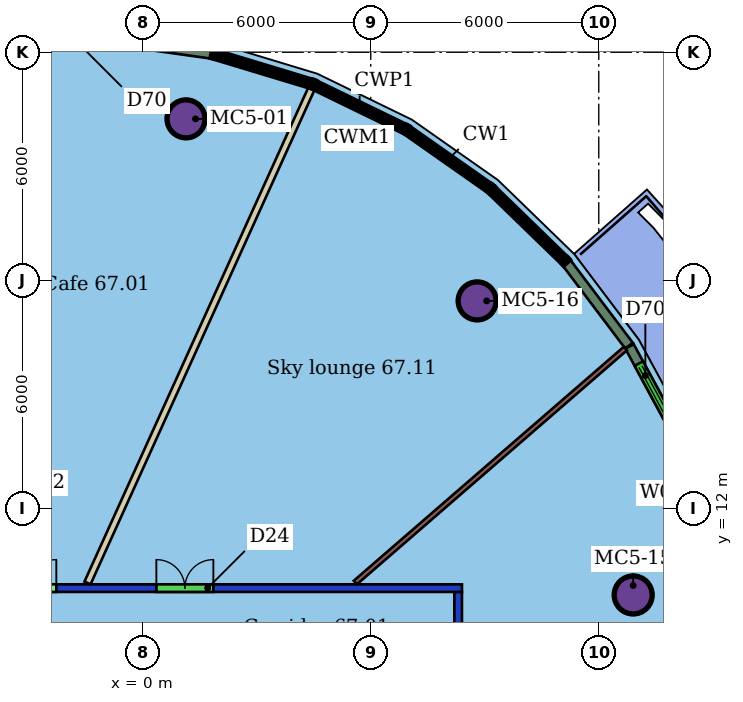
"""IFC4 building model, lengths in metres.
Left out: names, types, materials, properties, quantities, classifications, styles, units other than length and angle.
Written with IfcOpenShell. Run it as: python <this file> out.ifc"""

import sys

from ifc_helpers import new_model, si_unit, direction, frame, frame_2d, origin, origin_2d, place, context, subcontext, project, spatial, rectangle, hollow_circle, extrude, element, fill, save


model = new_model("IFC4")
c1 = context("Model", 3, precision=1e-05, world=origin(), true_north=direction((0.0, 1.0)))
c2 = subcontext(c1, "Body", "Model", "MODEL_VIEW")
j1 = project(units=[si_unit("LENGTHUNIT", "METRE"), si_unit("PLANEANGLEUNIT", "RADIAN")], contexts=[c1])
p1 = place(None, origin())
s1 = spatial("IfcSite", under=j1, at=p1, CompositionType="ELEMENT")
p2 = place(p1, origin())
s2 = spatial("IfcBuilding", under=s1, at=p2, CompositionType="ELEMENT")
p3 = place(p2, frame((0.0, 0.0, 272.1)))
s3 = spatial("IfcBuildingStorey", under=s2, at=p3, CompositionType="ELEMENT", Elevation=272.1)
for number, where, z_axis, x_axis in (
    (1, (1.138, 22.247, 0.0), (0.0, 0.0, 1.0), (1.0, 0.0, 0.0)),
    (2, (12.906, 9.72, 0.0), (0.0, 0.0, 1.0), (1.0, 0.0, 0.0)),
    (3, (8.8, 17.457, 0.0), (0.0, 0.0, 1.0), (1.0, 0.0, 0.0)),
):
    element("IfcColumn", number, at=place(p3, frame(where, z_axis=z_axis, x_axis=x_axis)), inside=s3, PredefinedType="COLUMN", context=c2, shape_type="SweptSolid", body=[
        extrude(hollow_circle(Radius=0.5, WallThickness=0.04, at=origin_2d()), origin(), (0.0, 0.0, 1.0), 3.45),
    ])
p4 = place(p3, frame((-20.4, 9.9, 0.0), z_axis=(0.0, 0.0, 1.0), x_axis=(1.0, 0.0, 0.0)))
e4 = element("IfcWall", 4, at=p4, inside=s3, PredefinedType="PARTITIONING", context=c2, shape_type="SweptSolid", body=[
    extrude(rectangle(XDim=28.8, YDim=0.2, at=frame_2d((14.4, 0.0))), origin(), (0.0, 0.0, 1.0), 3.1),
])
p5 = place(p4, frame((16.626, 0.0, 0.0)))
e5 = element("IfcOpeningElement", 5, at=p5, cuts=e4, PredefinedType="OPENING", context=c2, shape_type="SweptSolid", body=[
    extrude(rectangle(XDim=1.5, YDim=2.4, at=frame_2d((0.75, 1.2))), frame((0.0, 0.11, 0.0), z_axis=(0.0, -1.0, 0.0), x_axis=(1.0, 0.0, 0.0)), (0.0, 0.0, 1.0), 0.22),
])
p6 = place(p4, frame((9.938, 0.0, 0.0)))
e6 = element("IfcOpeningElement", 6, at=p6, cuts=e4, PredefinedType="OPENING", context=c2, shape_type="SweptSolid", body=[
    extrude(rectangle(XDim=1.5, YDim=2.1, at=frame_2d((0.75, 1.05))), frame((0.0, 0.11, 0.0), z_axis=(0.0, -1.0, 0.0), x_axis=(1.0, 0.0, 0.0)), (0.0, 0.0, 1.0), 0.22),
])
p7 = place(p4, frame((20.758, 0.0, 0.0)))
e7 = element("IfcOpeningElement", 7, at=p7, cuts=e4, PredefinedType="OPENING", context=c2, shape_type="SweptSolid", body=[
    extrude(rectangle(XDim=1.5, YDim=2.1, at=frame_2d((0.75, 1.05))), frame((0.0, 0.11, 0.0), z_axis=(0.0, -1.0, 0.0), x_axis=(1.0, 0.0, 0.0)), (0.0, 0.0, 1.0), 0.22),
])
p8 = place(p3, frame((8.3, 9.8, 0.0), z_axis=(0.0, 0.0, 1.0), x_axis=(0.0, -1.0, 0.0)))
e8 = element("IfcWall", 8, at=p8, inside=s3, PredefinedType="PARTITIONING", context=c2, shape_type="SweptSolid", body=[
    extrude(rectangle(XDim=19.6, YDim=0.2, at=frame_2d((9.8, 0.0))), origin(), (0.0, 0.0, 1.0), 3.1),
])
p9 = place(p8, frame((7.396, 0.0, 0.0)))
e9 = element("IfcOpeningElement", 9, at=p9, cuts=e8, PredefinedType="OPENING", context=c2, shape_type="SweptSolid", body=[
    extrude(rectangle(XDim=1.8, YDim=2.4, at=frame_2d((0.9, 1.2))), frame((0.0, 0.11, 0.0), z_axis=(0.0, -1.0, 0.0), x_axis=(1.0, 0.0, 0.0)), (0.0, 0.0, 1.0), 0.22),
])
p10 = place(p8, frame((2.153, 0.0, 0.0)))
e10 = element("IfcOpeningElement", 10, at=p10, cuts=e8, PredefinedType="OPENING", context=c2, shape_type="SweptSolid", body=[
    extrude(rectangle(XDim=1.0, YDim=2.4, at=frame_2d((0.5, 1.2))), frame((0.0, 0.11, 0.0), z_axis=(0.0, -1.0, 0.0), x_axis=(1.0, 0.0, 0.0)), (0.0, 0.0, 1.0), 0.22),
])
p11 = place(p3, frame((4.438, 23.04, 0.0), z_axis=(0.0, 0.0, 1.0), x_axis=(-0.412668744216, -0.910881170926, 0.0)))
e11 = element("IfcWall", 11, at=p11, inside=s3, PredefinedType="PARTITIONING", context=c2, shape_type="SweptSolid", body=[
    extrude(rectangle(XDim=14.276, YDim=0.175, at=frame_2d((7.138, 0.0))), origin(), (0.0, 0.0, 1.0), 3.45),
])
p12 = place(p3, frame((12.698, 16.203, 0.0), z_axis=(0.0, 0.0, 1.0), x_axis=(-0.75573450221, -0.654878127723, 0.0)))
e12 = element("IfcWall", 12, at=p12, inside=s3, PredefinedType="PARTITIONING", context=c2, shape_type="SweptSolid", body=[
    extrude(rectangle(XDim=9.399, YDim=0.125, at=frame_2d((4.7, 0.0))), origin(), (0.0, 0.0, 1.0), 3.45),
])
p13 = place(p3, frame((1.803, 23.958, 0.0), z_axis=(0.0, 0.0, 1.0), x_axis=(-0.99032300217, 0.138781667998, 0.0)))
e13 = element("IfcWall", 13, at=p13, inside=s3, PredefinedType="SOLIDWALL", context=c2, shape_type="SweptSolid", body=[
    extrude(rectangle(XDim=2.72, YDim=0.25, at=frame_2d((1.36, 0.0))), origin(), (0.0, 0.0, 1.0), 3.15),
])
p14 = place(p3, frame((14.156, 13.776, 0.0), z_axis=(0.0, 0.0, 1.0), x_axis=(-0.476845701511, 0.878987017509, 0.0)))
e14 = element("IfcWall", 14, at=p14, inside=s3, PredefinedType="SOLIDWALL", context=c2, shape_type="SweptSolid", body=[
    extrude(rectangle(XDim=2.824, YDim=0.25, at=frame_2d((1.412, 0.0))), origin(), (0.0, 0.0, 1.0), 3.15),
])
p15 = place(p14, frame((0.512, 0.0, 0.0)))
e15 = element("IfcOpeningElement", 15, at=p15, cuts=e14, PredefinedType="OPENING", context=c2, shape_type="SweptSolid", body=[
    extrude(rectangle(XDim=1.8, YDim=2.4, at=frame_2d((0.9, 1.2))), frame((0.0, 0.135, 0.0), z_axis=(0.0, -1.0, 0.0), x_axis=(1.0, 0.0, 0.0)), (0.0, 0.0, 1.0), 0.27),
])
p16 = place(p3, frame((12.796, 16.281, 0.0), z_axis=(0.0, 0.0, 1.0), x_axis=(-0.602094992284, 0.798424461215, 0.0)))
e16 = element("IfcWall", 16, at=p16, inside=s3, PredefinedType="SOLIDWALL", context=c2, shape_type="SweptSolid", body=[
    extrude(rectangle(XDim=2.719, YDim=0.25, at=frame_2d((1.36, 0.0))), origin(), (0.0, 0.0, 1.0), 3.15),
])
p17 = place(p5, origin())
e17 = element("IfcDoor", 17, at=p17, inside=s3, OperationType="DOUBLE_DOOR_SINGLE_SWING", PredefinedType="DOOR", context=c2, shape_type="SweptSolid", body=[
    extrude(rectangle(XDim=1.5, YDim=2.4, at=frame_2d((0.75, 1.2))), frame((0.0, 0.025, 0.0), z_axis=(0.0, -1.0, 0.0), x_axis=(1.0, 0.0, 0.0)), (0.0, 0.0, 1.0), 0.05),
])
fill(e5, e17)
p18 = place(p7, origin())
e18 = element("IfcDoor", 18, at=p18, inside=s3, OperationType="DOUBLE_DOOR_SINGLE_SWING", PredefinedType="DOOR", context=c2, shape_type="SweptSolid", body=[
    extrude(rectangle(XDim=1.5, YDim=2.1, at=frame_2d((0.75, 1.05))), frame((0.0, 0.025, 0.0), z_axis=(0.0, -1.0, 0.0), x_axis=(1.0, 0.0, 0.0)), (0.0, 0.0, 1.0), 0.05),
])
fill(e7, e18)
p19 = place(p15, origin())
e19 = element("IfcDoor", 19, at=p19, inside=s3, OperationType="DOUBLE_DOOR_SLIDING", PredefinedType="DOOR", context=c2, shape_type="SweptSolid", body=[
    extrude(rectangle(XDim=1.8, YDim=2.4, at=frame_2d((0.9, 1.2))), frame((0.0, 0.025, 0.0), z_axis=(0.0, -1.0, 0.0), x_axis=(1.0, 0.0, 0.0)), (0.0, 0.0, 1.0), 0.05),
])
fill(e15, e19)
save(model, sys.argv[1])
